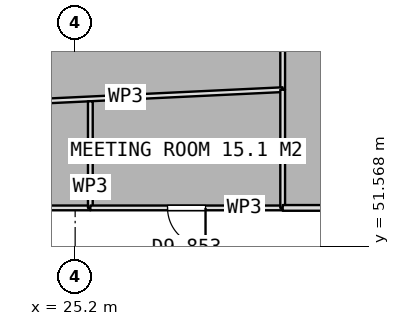
"""IFC4 building model, lengths in metres.
Left out: names, types, materials, properties, quantities, classifications, styles, units other than length and angle.
Written with IfcOpenShell. Run it as: python <this file> out.ifc"""

import sys

from ifc_helpers import new_model, si_unit, direction, frame, frame_2d, origin, place, context, subcontext, project, spatial, rectangle, extrude, element, fill, save


model = new_model("IFC4")
c1 = context("Model", 3, precision=1e-05, world=origin(), true_north=direction((0.0, 1.0)))
c2 = subcontext(c1, "Body", "Model", "MODEL_VIEW")
j1 = project(units=[si_unit("LENGTHUNIT", "METRE"), si_unit("PLANEANGLEUNIT", "RADIAN")], contexts=[c1])
p1 = place(None, origin())
s1 = spatial("IfcSite", under=j1, at=p1, CompositionType="ELEMENT")
p2 = place(p1, origin())
s2 = spatial("IfcBuilding", under=s1, at=p2, CompositionType="ELEMENT")
p3 = place(p2, frame((0.0, 0.0, 210.2)))
s3 = spatial("IfcBuildingStorey", under=s2, at=p3, CompositionType="ELEMENT", Elevation=210.2)
p4 = place(p3, frame((30.661, 61.313, 0.0), z_axis=(0.0, 0.0, 1.0), x_axis=(0.0, -1.0, 0.0)))
e1 = element("IfcWall", 1, at=p4, inside=s3, PredefinedType="PARTITIONING", context=c2, shape_type="SweptSolid", body=[
    extrude(rectangle(XDim=5.627, YDim=0.125, at=frame_2d((2.813, 0.0))), origin(), (0.0, 0.0, 1.0), 3.5),
])
p5 = place(p4, frame((2.314, 0.0, 0.0)))
e2 = element("IfcOpeningElement", 2, at=p5, cuts=e1, PredefinedType="OPENING", context=c2, shape_type="SweptSolid", body=[
    extrude(rectangle(XDim=1.0, YDim=2.1, at=frame_2d((0.5, 1.05))), frame((0.0, 0.073, 0.0), z_axis=(0.0, -1.0, 0.0), x_axis=(1.0, 0.0, 0.0)), (0.0, 0.0, 1.0), 0.145),
])
p6 = place(p3, frame((30.661, 55.686, 0.0), z_axis=(0.0, 0.0, 1.0), x_axis=(-0.998858431805, -0.047768537897, 0.0)))
e3 = element("IfcWall", 3, at=p6, inside=s3, PredefinedType="PARTITIONING", context=c2, shape_type="SweptSolid", body=[
    extrude(rectangle(XDim=8.27, YDim=0.125, at=frame_2d((4.135, 0.0))), origin(), (0.0, 0.0, 1.0), 3.5),
])
p7 = place(p3, frame((25.6, 52.575, 0.0), z_axis=(0.0, 0.0, 1.0), x_axis=(-1.0, 0.0, 0.0)))
e4 = element("IfcWall", 4, at=p7, inside=s3, PredefinedType="PARTITIONING", context=c2, shape_type="SweptSolid", body=[
    extrude(rectangle(XDim=3.2, YDim=0.125, at=frame_2d((1.6, 0.0))), origin(), (0.0, 0.0, 1.0), 3.5),
])
p8 = place(p3, frame((25.6, 55.381, 0.0), z_axis=(0.0, 0.0, 1.0), x_axis=(0.0, -1.0, 0.0)))
e5 = element("IfcWall", 5, at=p8, inside=s3, PredefinedType="PARTITIONING", context=c2, shape_type="SweptSolid", body=[
    extrude(rectangle(XDim=2.806, YDim=0.125, at=frame_2d((1.403, 0.0))), origin(), (0.0, 0.0, 1.0), 3.5),
])
p9 = place(p3, frame((30.661, 52.575, 0.0), z_axis=(0.0, 0.0, 1.0), x_axis=(-1.0, 0.0, 0.0)))
e6 = element("IfcWall", 6, at=p9, inside=s3, PredefinedType="PARTITIONING", context=c2, shape_type="SweptSolid", body=[
    extrude(rectangle(XDim=5.061, YDim=0.125, at=frame_2d((2.53, 0.0))), origin(), (0.0, 0.0, 1.0), 3.5),
])
p10 = place(p9, frame((2.03, 0.0, 0.0)))
e7 = element("IfcOpeningElement", 7, at=p10, cuts=e6, PredefinedType="OPENING", context=c2, shape_type="SweptSolid", body=[
    extrude(rectangle(XDim=1.0, YDim=2.1, at=frame_2d((0.5, 1.05))), frame((0.0, 0.073, 0.0), z_axis=(0.0, -1.0, 0.0), x_axis=(1.0, 0.0, 0.0)), (0.0, 0.0, 1.0), 0.145),
])
p11 = place(p3, frame((30.661, 55.686, 0.0), z_axis=(0.0, 0.0, 1.0), x_axis=(0.0, -1.0, 0.0)))
e8 = element("IfcWall", 8, at=p11, inside=s3, PredefinedType="PARTITIONING", context=c2, shape_type="SweptSolid", body=[
    extrude(rectangle(XDim=3.111, YDim=0.125, at=frame_2d((1.556, 0.0))), origin(), (0.0, 0.0, 1.0), 3.5),
])
p12 = place(p3, frame((53.2, 52.575, 0.0), z_axis=(0.0, 0.0, 1.0), x_axis=(-1.0, 0.0, 0.0)))
e9 = element("IfcWall", 9, at=p12, inside=s3, PredefinedType="PARTITIONING", context=c2, shape_type="SweptSolid", body=[
    extrude(rectangle(XDim=22.539, YDim=0.15, at=frame_2d((11.27, 0.0))), origin(), (0.0, 0.0, 1.0), 3.5),
])
p13 = place(p10, origin())
e10 = element("IfcDoor", 10, at=p13, inside=s3, OperationType="SINGLE_SWING_LEFT", PredefinedType="DOOR", context=c2, shape_type="SweptSolid", body=[
    extrude(rectangle(XDim=1.0, YDim=2.1, at=frame_2d((0.5, 1.05))), frame((0.0, 0.025, 0.0), z_axis=(0.0, -1.0, 0.0), x_axis=(1.0, 0.0, 0.0)), (0.0, 0.0, 1.0), 0.05),
])
fill(e7, e10)
save(model, sys.argv[1])
